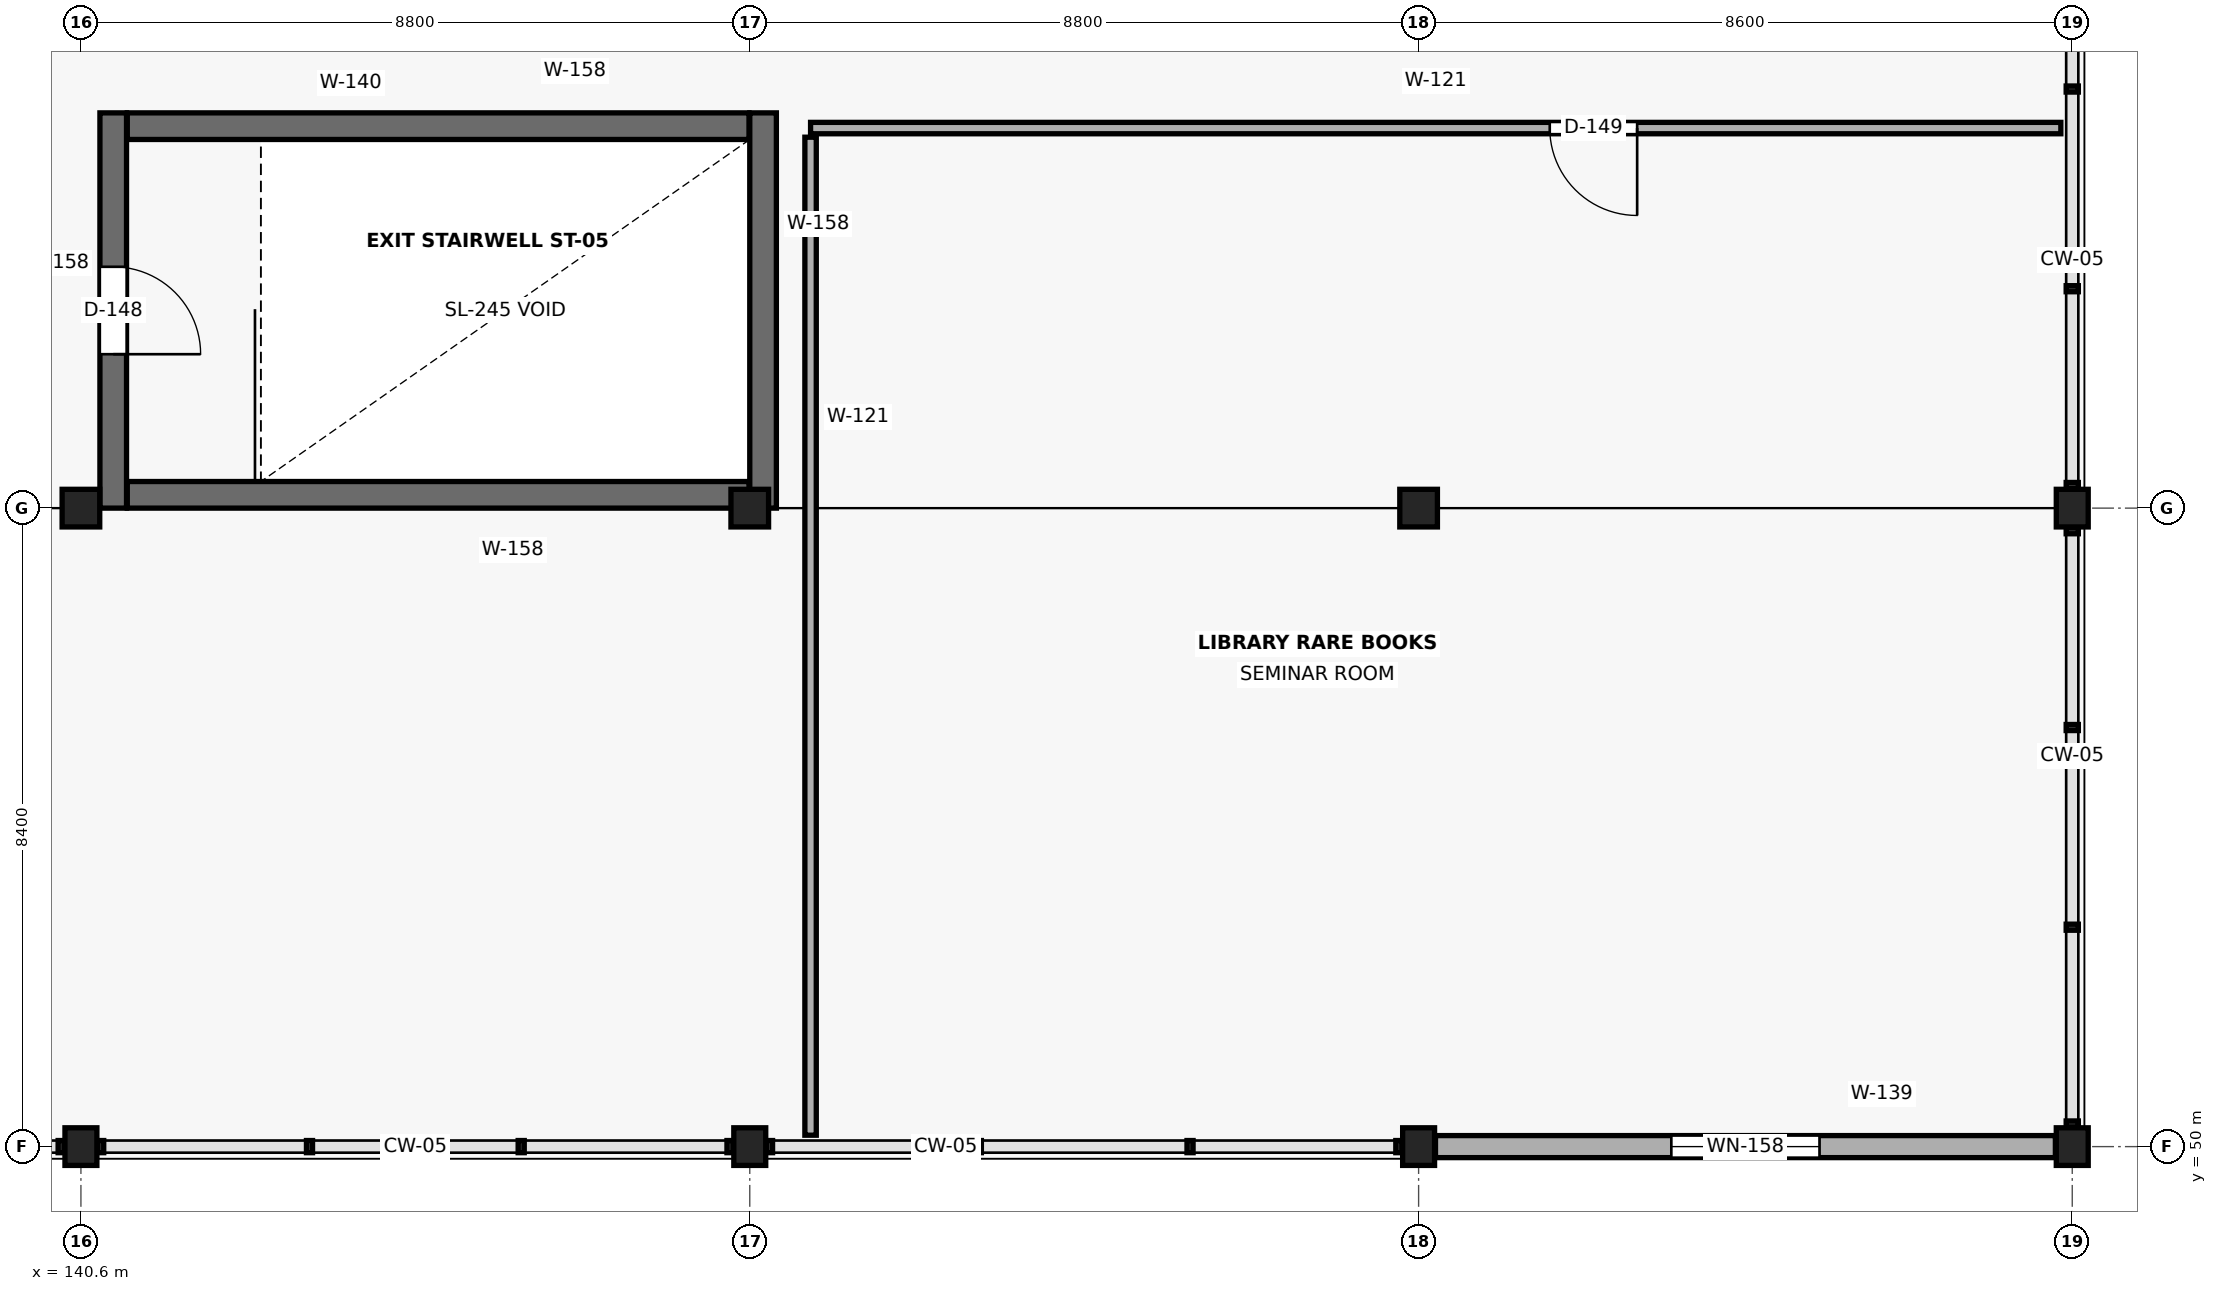
"""IFC4 building model, lengths in metres.
Left out: names, types, materials, properties, quantities, classifications, styles, units other than length and angle.
Written with IfcOpenShell. Run it as: python <this file> out.ifc"""

import sys

from ifc_helpers import new_model, si_unit, direction, frame, frame_2d, origin, origin_2d, place, context, subcontext, project, spatial, rectangle, extrude, element, fill, save


model = new_model("IFC4")
c1 = context("Model", 3, precision=1e-05, world=origin(), true_north=direction((0.0, 1.0)))
c2 = subcontext(c1, "Body", "Model", "MODEL_VIEW")
j1 = project(units=[si_unit("LENGTHUNIT", "METRE"), si_unit("PLANEANGLEUNIT", "RADIAN")], contexts=[c1])
p1 = place(None, origin())
s1 = spatial("IfcSite", under=j1, at=p1, CompositionType="ELEMENT")
p2 = place(p1, origin())
s2 = spatial("IfcBuilding", under=s1, at=p2, CompositionType="ELEMENT")
p3 = place(p2, frame((0.0, 0.0, 14.4)))
s3 = spatial("IfcBuildingStorey", under=s2, at=p3, CompositionType="ELEMENT", Elevation=14.4)
p4 = place(p3, frame((140.6, 50.0, 0.0), z_axis=(0.0, 0.0, 1.0), x_axis=(1.0, 0.0, 0.0)))
e1 = element("IfcColumn", 1, at=p4, inside=s3, PredefinedType="COLUMN", context=c2, shape_type="SweptSolid", body=[
    extrude(rectangle(XDim=0.42, YDim=0.495, at=origin_2d()), origin(), (0.0, 0.0, 1.0), 3.9),
])
p5 = place(p3, frame((140.6, 58.4, 0.0), z_axis=(0.0, 0.0, 1.0), x_axis=(1.0, 0.0, 0.0)))
e2 = element("IfcColumn", 2, at=p5, inside=s3, PredefinedType="COLUMN", context=c2, shape_type="SweptSolid", body=[
    extrude(rectangle(XDim=0.495, YDim=0.495, at=origin_2d()), origin(), (0.0, 0.0, 1.0), 3.9),
])
p6 = place(p3, frame((149.4, 50.0, 0.0), z_axis=(0.0, 0.0, 1.0), x_axis=(1.0, 0.0, 0.0)))
e3 = element("IfcColumn", 3, at=p6, inside=s3, PredefinedType="COLUMN", context=c2, shape_type="SweptSolid", body=[
    extrude(rectangle(XDim=0.42, YDim=0.495, at=origin_2d()), origin(), (0.0, 0.0, 1.0), 3.9),
])
p7 = place(p3, frame((149.4, 58.4, 0.0), z_axis=(0.0, 0.0, 1.0), x_axis=(1.0, 0.0, 0.0)))
e4 = element("IfcColumn", 4, at=p7, inside=s3, PredefinedType="COLUMN", context=c2, shape_type="SweptSolid", body=[
    extrude(rectangle(XDim=0.495, YDim=0.495, at=origin_2d()), origin(), (0.0, 0.0, 1.0), 3.9),
])
p8 = place(p3, frame((158.2, 50.0, 0.0), z_axis=(0.0, 0.0, 1.0), x_axis=(1.0, 0.0, 0.0)))
e5 = element("IfcColumn", 5, at=p8, inside=s3, PredefinedType="COLUMN", context=c2, shape_type="SweptSolid", body=[
    extrude(rectangle(XDim=0.42, YDim=0.495, at=origin_2d()), origin(), (0.0, 0.0, 1.0), 3.9),
])
p9 = place(p3, frame((158.2, 58.4, 0.0), z_axis=(0.0, 0.0, 1.0), x_axis=(1.0, 0.0, 0.0)))
e6 = element("IfcColumn", 6, at=p9, inside=s3, PredefinedType="COLUMN", context=c2, shape_type="SweptSolid", body=[
    extrude(rectangle(XDim=0.495, YDim=0.495, at=origin_2d()), origin(), (0.0, 0.0, 1.0), 3.9),
])
for number, where, z_axis, x_axis in (
    (7, (166.8, 50.0, 0.0), (0.0, 0.0, 1.0), (1.0, 0.0, 0.0)),
    (8, (166.8, 58.4, 0.0), (0.0, 0.0, 1.0), (1.0, 0.0, 0.0)),
):
    element("IfcColumn", number, at=place(p3, frame(where, z_axis=z_axis, x_axis=x_axis)), inside=s3, PredefinedType="COLUMN", context=c2, shape_type="SweptSolid", body=[
        extrude(rectangle(XDim=0.42, YDim=0.495, at=origin_2d()), origin(), (0.0, 0.0, 1.0), 3.9),
    ])
p10 = place(p3, frame((166.578, 50.0, 0.0), z_axis=(0.0, 0.0, 1.0), x_axis=(-1.0, 0.0, 0.0)))
e9 = element("IfcWall", 9, at=p10, inside=s3, PredefinedType="SOLIDWALL", context=c2, shape_type="SweptSolid", body=[
    extrude(rectangle(XDim=8.156, YDim=0.29, at=frame_2d((4.078, 0.0))), origin(), (0.0, 0.0, 1.0), 2.855),
])
p11 = place(p10, frame((3.103, 0.0, 0.85)))
e10 = element("IfcOpeningElement", 10, at=p11, cuts=e9, PredefinedType="OPENING", context=c2, shape_type="SweptSolid", body=[
    extrude(rectangle(XDim=1.95, YDim=1.9, at=frame_2d((0.975, 0.95))), frame((0.0, 0.157, 0.0), z_axis=(0.0, -1.0, 0.0), x_axis=(1.0, 0.0, 0.0)), (0.0, 0.0, 1.0), 0.314),
])
p12 = place(p3, frame((141.025, 63.6, 0.0), z_axis=(0.0, 0.0, 1.0), x_axis=(0.0, -1.0, 0.0)))
e11 = element("IfcWall", 11, at=p12, inside=s3, PredefinedType="SHEAR", context=c2, shape_type="SweptSolid", body=[
    extrude(rectangle(XDim=5.2, YDim=0.35, at=frame_2d((2.6, 0.0))), origin(), (0.0, 0.0, 1.0), 3.655),
])
p13 = place(p12, frame((2.025, 0.0, 0.0)))
e12 = element("IfcOpeningElement", 12, at=p13, cuts=e11, PredefinedType="OPENING", context=c2, shape_type="SweptSolid", body=[
    extrude(rectangle(XDim=1.15, YDim=2.2, at=frame_2d((0.575, 1.1))), frame((0.0, 0.187, 0.0), z_axis=(0.0, -1.0, 0.0), x_axis=(1.0, 0.0, 0.0)), (0.0, 0.0, 1.0), 0.374),
])
p14 = place(p3, frame((149.575, 58.4, 0.0), z_axis=(0.0, 0.0, 1.0), x_axis=(0.0, 1.0, 0.0)))
e13 = element("IfcWall", 13, at=p14, inside=s3, PredefinedType="SHEAR", context=c2, shape_type="SweptSolid", body=[
    extrude(rectangle(XDim=5.2, YDim=0.35, at=frame_2d((2.6, 0.0))), origin(), (0.0, 0.0, 1.0), 3.655),
])
for number, where, z_axis, x_axis in (
    (14, (141.21, 58.575, 0.0), (0.0, 0.0, 1.0), (1.0, 0.0, 0.0)),
    (15, (149.39, 63.425, 0.0), (0.0, 0.0, 1.0), (-1.0, 0.0, 0.0)),
):
    element("IfcWall", number, at=place(p3, frame(where, z_axis=z_axis, x_axis=x_axis)), inside=s3, PredefinedType="SHEAR", context=c2, shape_type="SweptSolid", body=[
        extrude(rectangle(XDim=8.18, YDim=0.35, at=frame_2d((4.09, 0.0))), origin(), (0.0, 0.0, 1.0), 3.655),
    ])
p15 = place(p3, frame((166.65, 63.4, 0.0), z_axis=(0.0, 0.0, 1.0), x_axis=(-1.0, 0.0, 0.0)))
e16 = element("IfcWall", 16, at=p15, inside=s3, PredefinedType="PARTITIONING", context=c2, shape_type="SweptSolid", body=[
    extrude(rectangle(XDim=16.45, YDim=0.15, at=frame_2d((8.225, 0.0))), origin(), (0.0, 0.0, 1.0), 3.655),
])
p16 = place(p15, frame((5.575, 0.0, 0.0)))
e17 = element("IfcOpeningElement", 17, at=p16, cuts=e16, PredefinedType="OPENING", context=c2, shape_type="SweptSolid", body=[
    extrude(rectangle(XDim=1.15, YDim=2.3, at=frame_2d((0.575, 1.15))), frame((0.0, 0.087, 0.0), z_axis=(0.0, -1.0, 0.0), x_axis=(1.0, 0.0, 0.0)), (0.0, 0.0, 1.0), 0.174),
])
p17 = place(p3, frame((150.2, 63.28, 0.0), z_axis=(0.0, 0.0, 1.0), x_axis=(0.0, -1.0, 0.0)))
e18 = element("IfcWall", 18, at=p17, inside=s3, PredefinedType="PARTITIONING", context=c2, shape_type="SweptSolid", body=[
    extrude(rectangle(XDim=13.13, YDim=0.15, at=frame_2d((6.565, 0.0))), origin(), (0.0, 0.0, 1.0), 3.655),
])
p18 = place(p11, origin())
e19 = element("IfcWindow", 19, at=p18, inside=s3, PartitioningType="SINGLE_PANEL", PredefinedType="WINDOW", context=c2, shape_type="SweptSolid", body=[
    extrude(rectangle(XDim=1.95, YDim=1.9, at=frame_2d((0.975, 0.95))), frame((0.0, 0.03, 0.0), z_axis=(0.0, -1.0, 0.0), x_axis=(1.0, 0.0, 0.0)), (0.0, 0.0, 1.0), 0.06),
])
fill(e10, e19)
p19 = place(p13, origin())
e20 = element("IfcDoor", 20, at=p19, inside=s3, OperationType="SINGLE_SWING_RIGHT", PredefinedType="DOOR", context=c2, shape_type="SweptSolid", body=[
    extrude(rectangle(XDim=1.15, YDim=2.2, at=frame_2d((0.575, 1.1))), frame((0.0, 0.025, 0.0), z_axis=(0.0, -1.0, 0.0), x_axis=(1.0, 0.0, 0.0)), (0.0, 0.0, 1.0), 0.05),
])
fill(e12, e20)
p20 = place(p16, origin())
e21 = element("IfcDoor", 21, at=p20, inside=s3, OperationType="SINGLE_SWING_LEFT", PredefinedType="DOOR", context=c2, shape_type="SweptSolid", body=[
    extrude(rectangle(XDim=1.15, YDim=2.3, at=frame_2d((0.575, 1.15))), frame((0.0, 0.025, 0.0), z_axis=(0.0, -1.0, 0.0), x_axis=(1.0, 0.0, 0.0)), (0.0, 0.0, 1.0), 0.05),
])
fill(e17, e21)
save(model, sys.argv[1])
